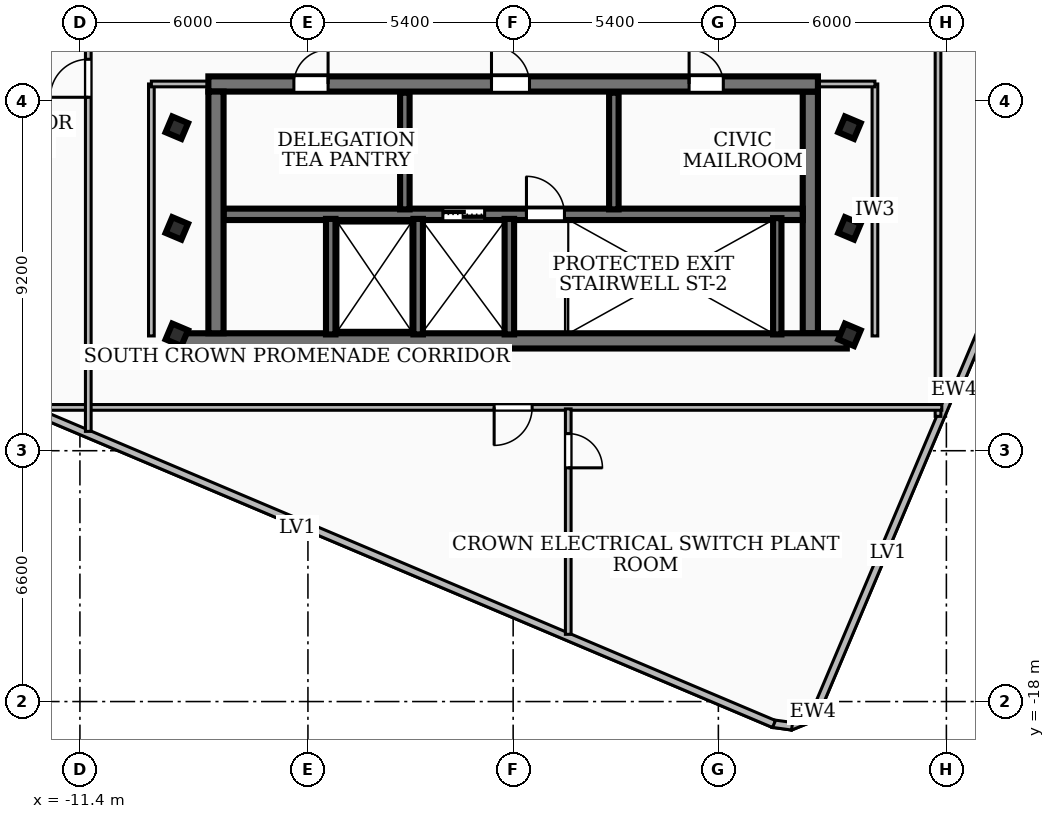
"""IFC4 building model, lengths in metres.
Left out: names, types, materials, properties, quantities, classifications, styles, units other than length and angle.
Written with IfcOpenShell. Run it as: python <this file> out.ifc"""

import sys

from ifc_helpers import new_model, si_unit, direction, frame, frame_2d, origin, origin_2d, place, context, subcontext, project, spatial, rectangle, hollow_rectangle, extrude, element, fill, save


model = new_model("IFC4")
c1 = context("Model", 3, precision=1e-05, world=origin(), true_north=direction((0.0, 1.0)))
c2 = subcontext(c1, "Body", "Model", "MODEL_VIEW")
j1 = project(units=[si_unit("LENGTHUNIT", "METRE"), si_unit("PLANEANGLEUNIT", "RADIAN")], contexts=[c1])
p1 = place(None, origin())
s1 = spatial("IfcSite", under=j1, at=p1, CompositionType="ELEMENT")
p2 = place(p1, origin())
s2 = spatial("IfcBuilding", under=s1, at=p2, CompositionType="ELEMENT")
p3 = place(p2, frame((0.0, 0.0, 301.68)))
s3 = spatial("IfcBuildingStorey", under=s2, at=p3, CompositionType="ELEMENT", Elevation=301.68)
p4 = place(p3, frame((8.78, -8.51, 0.0), z_axis=(0.0, 0.0, 1.0), x_axis=(-1.0, 0.0, 0.0)))
e1 = element("IfcWall", 1, at=p4, inside=s3, PredefinedType="SHEAR", context=c2, shape_type="SweptSolid", body=[
    extrude(rectangle(XDim=17.56, YDim=0.4, at=frame_2d((8.78, 0.0))), origin(), (0.0, 0.0, 1.0), 3.89),
])
p5 = place(p3, frame((-8.02, -1.75, 0.0), z_axis=(0.0, 0.0, 1.0), x_axis=(1.0, 0.0, 0.0)))
e2 = element("IfcWall", 2, at=p5, inside=s3, PredefinedType="SHEAR", context=c2, shape_type="SweptSolid", body=[
    extrude(rectangle(XDim=16.04, YDim=0.4, at=frame_2d((8.02, 0.0))), origin(), (0.0, 0.0, 1.0), 3.89),
])
p6 = place(p5, frame((7.45, 0.0, 0.0)))
e3 = element("IfcOpeningElement", 3, at=p6, cuts=e2, PredefinedType="OPENING", context=c2, shape_type="SweptSolid", body=[
    extrude(rectangle(XDim=1.0, YDim=2.1, at=frame_2d((0.5, 1.05))), frame((0.0, 0.21, 0.0), z_axis=(0.0, -1.0, 0.0), x_axis=(1.0, 0.0, 0.0)), (0.0, 0.0, 1.0), 0.42),
])
p7 = place(p5, frame((12.65, 0.0, 0.0)))
e4 = element("IfcOpeningElement", 4, at=p7, cuts=e2, PredefinedType="OPENING", context=c2, shape_type="SweptSolid", body=[
    extrude(rectangle(XDim=0.9, YDim=2.06, at=frame_2d((0.45, 1.03))), frame((0.0, 0.21, 0.0), z_axis=(0.0, -1.0, 0.0), x_axis=(1.0, 0.0, 0.0)), (0.0, 0.0, 1.0), 0.42),
])
p8 = place(p5, frame((2.25, 0.0, 0.0)))
e5 = element("IfcOpeningElement", 5, at=p8, cuts=e2, PredefinedType="OPENING", context=c2, shape_type="SweptSolid", body=[
    extrude(rectangle(XDim=0.9, YDim=2.06, at=frame_2d((0.45, 1.03))), frame((0.0, 0.21, 0.0), z_axis=(0.0, -1.0, 0.0), x_axis=(1.0, 0.0, 0.0)), (0.0, 0.0, 1.0), 0.42),
])
for number, where, z_axis, x_axis in (
    (6, (-7.82, -8.31, 0.0), (0.0, 0.0, 1.0), (0.0, 1.0, 0.0)),
    (7, (7.82, -1.95, 0.0), (0.0, 0.0, 1.0), (0.0, -1.0, 0.0)),
):
    element("IfcWall", number, at=place(p3, frame(where, z_axis=z_axis, x_axis=x_axis)), inside=s3, PredefinedType="SHEAR", context=c2, shape_type="SweptSolid", body=[
        extrude(rectangle(XDim=6.36, YDim=0.4, at=frame_2d((3.18, 0.0))), origin(), (0.0, 0.0, 1.0), 3.89),
    ])
p9 = place(p3, frame((-7.62, -5.18, 0.0), z_axis=(0.0, 0.0, 1.0), x_axis=(1.0, 0.0, 0.0)))
e8 = element("IfcWall", 8, at=p9, inside=s3, PredefinedType="SOLIDWALL", context=c2, shape_type="SweptSolid", body=[
    extrude(rectangle(XDim=15.24, YDim=0.3, at=frame_2d((7.62, 0.0))), origin(), (0.0, 0.0, 1.0), 3.89),
])
p10 = place(p9, frame((5.77, 0.0, 0.0)))
e9 = element("IfcOpeningElement", 9, at=p10, cuts=e8, PredefinedType="OPENING", context=c2, shape_type="SweptSolid", body=[
    extrude(rectangle(XDim=1.1, YDim=2.15, at=frame_2d((0.55, 1.075))), frame((0.0, 0.16, 0.0), z_axis=(0.0, -1.0, 0.0), x_axis=(1.0, 0.0, 0.0)), (0.0, 0.0, 1.0), 0.32),
])
p11 = place(p9, frame((7.97, 0.0, 0.0)))
e10 = element("IfcOpeningElement", 10, at=p11, cuts=e8, PredefinedType="OPENING", context=c2, shape_type="SweptSolid", body=[
    extrude(rectangle(XDim=1.0, YDim=2.1, at=frame_2d((0.5, 1.05))), frame((0.0, 0.16, 0.0), z_axis=(0.0, -1.0, 0.0), x_axis=(1.0, 0.0, 0.0)), (0.0, 0.0, 1.0), 0.32),
])
p12 = place(p3, frame((6.95, -8.34, 0.0), z_axis=(0.0, 0.0, 1.0), x_axis=(0.0, 1.0, 0.0)))
e11 = element("IfcWall", 11, at=p12, inside=s3, PredefinedType="SOLIDWALL", context=c2, shape_type="SweptSolid", body=[
    extrude(rectangle(XDim=3.06, YDim=0.22, at=frame_2d((1.53, 0.0))), origin(), (0.0, 0.0, 1.0), 3.89),
])
for number, where, z_axis, x_axis in (
    (12, (-0.1, -8.34, 0.0), (0.0, 0.0, 1.0), (0.0, 1.0, 0.0)),
    (13, (-2.5, -8.34, 0.0), (0.0, 0.0, 1.0), (0.0, 1.0, 0.0)),
    (14, (-4.8, -8.34, 0.0), (0.0, 0.0, 1.0), (0.0, 1.0, 0.0)),
):
    element("IfcWall", number, at=place(p3, frame(where, z_axis=z_axis, x_axis=x_axis)), inside=s3, PredefinedType="SOLIDWALL", context=c2, shape_type="SweptSolid", body=[
        extrude(rectangle(XDim=3.04, YDim=0.25, at=frame_2d((1.52, 0.0))), origin(), (0.0, 0.0, 1.0), 3.89),
    ])
for number, where, z_axis, x_axis in (
    (15, (-2.85, -5.05, 0.0), (0.0, 0.0, 1.0), (0.0, 1.0, 0.0)),
    (16, (2.65, -5.05, 0.0), (0.0, 0.0, 1.0), (0.0, 1.0, 0.0)),
):
    element("IfcWall", number, at=place(p3, frame(where, z_axis=z_axis, x_axis=x_axis)), inside=s3, PredefinedType="SOLIDWALL", context=c2, shape_type="SweptSolid", body=[
        extrude(rectangle(XDim=3.07, YDim=0.25, at=frame_2d((1.535, 0.0))), origin(), (0.0, 0.0, 1.0), 3.89),
    ])
for number, where, z_axis, x_axis in (
    (17, (-8.85, -5.55, 0.0), (0.0, 0.0, 1.0), (0.389, 0.921, 0.0)),
    (18, (-8.85, -2.9, 0.0), (0.0, 0.0, 1.0), (0.389, 0.921, 0.0)),
    (19, (8.85, -5.55, 0.0), (0.0, 0.0, 1.0), (0.389, 0.921, 0.0)),
    (20, (8.85, -2.9, 0.0), (0.0, 0.0, 1.0), (0.389, 0.921, 0.0)),
    (21, (8.85, -8.35, 0.0), (0.0, 0.0, 1.0), (0.389, 0.921, 0.0)),
    (22, (-8.85, -8.35, 0.0), (0.0, 0.0, 1.0), (0.389, 0.921, 0.0)),
):
    element("IfcColumn", number, at=place(p3, frame(where, z_axis=z_axis, x_axis=x_axis)), inside=s3, PredefinedType="COLUMN", context=c2, shape_type="SweptSolid", body=[
        extrude(hollow_rectangle(XDim=0.45, YDim=0.45, WallThickness=0.022, at=origin_2d()), origin(), (0.0, 0.0, 1.0), 4.14),
    ])
p13 = place(p3, frame((11.756, -9.608, 0.0), z_axis=(0.0, 0.0, 1.0), x_axis=(-0.61252495827, -0.79045124802, 0.0)))
e23 = element("IfcWall", 23, at=p13, inside=s3, PredefinedType="SOLIDWALL", context=c2, shape_type="SweptSolid", body=[
    extrude(rectangle(XDim=0.49, YDim=0.2, at=frame_2d((0.245, 0.0))), origin(), (0.0, 0.0, 1.0), 3.89),
])
p14 = place(p3, frame((11.481, -9.952, 0.0), z_axis=(0.0, 0.0, 1.0), x_axis=(-0.389505259475, -0.92102424118, 0.0)))
e24 = element("IfcWall", 24, at=p14, inside=s3, PredefinedType="SOLIDWALL", context=c2, shape_type="SweptSolid", body=[
    extrude(rectangle(XDim=8.867, YDim=0.2, at=frame_2d((4.434, 0.0))), origin(), (0.0, 0.0, 1.0), 3.89),
])
p15 = place(p3, frame((8.052, -18.076, 0.0), z_axis=(0.0, 0.0, 1.0), x_axis=(-0.613266470563, -0.789876089069, 0.0)))
e25 = element("IfcWall", 25, at=p15, inside=s3, PredefinedType="SOLIDWALL", context=c2, shape_type="SweptSolid", body=[
    extrude(rectangle(XDim=0.527, YDim=0.2, at=frame_2d((0.263, 0.0))), origin(), (0.0, 0.0, 1.0), 3.89),
])
p16 = place(p3, frame((7.767, -18.463, 0.0), z_axis=(0.0, 0.0, 1.0), x_axis=(-0.926663227271, -0.375892621934, 0.0)))
e26 = element("IfcWall", 26, at=p16, inside=s3, PredefinedType="SOLIDWALL", context=c2, shape_type="SweptSolid", body=[
    extrude(rectangle(XDim=0.514, YDim=0.2, at=frame_2d((0.257, 0.0))), origin(), (0.0, 0.0, 1.0), 3.89),
])
p17 = place(p3, frame((7.339, -18.65, 0.0), z_axis=(0.0, 0.0, 1.0), x_axis=(-0.99065777357, 0.136371462064, 0.0)))
e27 = element("IfcWall", 27, at=p17, inside=s3, PredefinedType="SOLIDWALL", context=c2, shape_type="SweptSolid", body=[
    extrude(rectangle(XDim=0.528, YDim=0.2, at=frame_2d((0.264, 0.0))), origin(), (0.0, 0.0, 1.0), 3.89),
])
p18 = place(p3, frame((6.864, -18.591, 0.0), z_axis=(0.0, 0.0, 1.0), x_axis=(-0.921043011302, 0.389460872658, 0.0)))
e28 = element("IfcWall", 28, at=p18, inside=s3, PredefinedType="SOLIDWALL", context=c2, shape_type="SweptSolid", body=[
    extrude(rectangle(XDim=27.125, YDim=0.2, at=frame_2d((13.562, 0.0))), origin(), (0.0, 0.0, 1.0), 3.89),
])
p19 = place(p3, frame((15.096, -1.693, 0.0), z_axis=(0.0, 0.0, 1.0), x_axis=(-0.389467605067, -0.92104016449, 0.0)))
e29 = element("IfcWall", 29, at=p19, inside=s3, PredefinedType="SOLIDWALL", context=c2, shape_type="SweptSolid", body=[
    extrude(rectangle(XDim=8.64, YDim=0.2, at=frame_2d((4.32, 0.0))), origin(), (0.0, 0.0, 1.0), 3.89),
])
p20 = place(p3, frame((-9.52, -8.38, 0.0), z_axis=(0.0, 0.0, 1.0), x_axis=(0.0, 1.0, 0.0)))
e30 = element("IfcWall", 30, at=p20, inside=s3, PredefinedType="PARTITIONING", context=c2, shape_type="SweptSolid", body=[
    extrude(rectangle(XDim=6.63, YDim=0.15, at=frame_2d((3.315, 0.0))), origin(), (0.0, 0.0, 1.0), 3.89),
])
p21 = place(p3, frame((-7.85, -1.75, 0.0), z_axis=(0.0, 0.0, 1.0), x_axis=(-1.0, 0.0, 0.0)))
e31 = element("IfcWall", 31, at=p21, inside=s3, PredefinedType="PARTITIONING", context=c2, shape_type="SweptSolid", body=[
    extrude(rectangle(XDim=1.67, YDim=0.15, at=frame_2d((0.835, 0.0))), origin(), (0.0, 0.0, 1.0), 3.27),
])
p22 = place(p3, frame((9.52, -8.38, 0.0), z_axis=(0.0, 0.0, 1.0), x_axis=(0.0, 1.0, 0.0)))
e32 = element("IfcWall", 32, at=p22, inside=s3, PredefinedType="PARTITIONING", context=c2, shape_type="SweptSolid", body=[
    extrude(rectangle(XDim=6.63, YDim=0.15, at=frame_2d((3.315, 0.0))), origin(), (0.0, 0.0, 1.0), 3.26),
])
p23 = place(p3, frame((7.85, -1.75, 0.0), z_axis=(0.0, 0.0, 1.0), x_axis=(1.0, 0.0, 0.0)))
e33 = element("IfcWall", 33, at=p23, inside=s3, PredefinedType="PARTITIONING", context=c2, shape_type="SweptSolid", body=[
    extrude(rectangle(XDim=1.67, YDim=0.15, at=frame_2d((0.835, 0.0))), origin(), (0.0, 0.0, 1.0), 3.27),
])
p24 = place(p3, frame((11.18, 10.891, 0.0), z_axis=(0.0, 0.0, 1.0), x_axis=(0.0, -1.0, 0.0)))
e34 = element("IfcWall", 34, at=p24, inside=s3, PredefinedType="PARTITIONING", context=c2, shape_type="SweptSolid", body=[
    extrude(rectangle(XDim=21.387, YDim=0.15, at=frame_2d((10.694, 0.0))), origin(), (0.0, 0.0, 1.0), 3.26),
])
p25 = place(p24, frame((10.391, 0.0, 0.0)))
e35 = element("IfcOpeningElement", 35, at=p25, cuts=e34, PredefinedType="OPENING", context=c2, shape_type="SweptSolid", body=[
    extrude(rectangle(XDim=1.0, YDim=2.1, at=frame_2d((0.5, 1.05))), frame((0.0, 0.085, 0.0), z_axis=(0.0, -1.0, 0.0), x_axis=(1.0, 0.0, 0.0)), (0.0, 0.0, 1.0), 0.17),
])
p26 = place(p3, frame((-11.18, -10.891, 0.0), z_axis=(0.0, 0.0, 1.0), x_axis=(0.0, 1.0, 0.0)))
e36 = element("IfcWall", 36, at=p26, inside=s3, PredefinedType="PARTITIONING", context=c2, shape_type="SweptSolid", body=[
    extrude(rectangle(XDim=21.387, YDim=0.15, at=frame_2d((10.694, 0.0))), origin(), (0.0, 0.0, 1.0), 3.26),
])
p27 = place(p26, frame((8.791, 0.0, 0.0)))
e37 = element("IfcOpeningElement", 37, at=p27, cuts=e36, PredefinedType="OPENING", context=c2, shape_type="SweptSolid", body=[
    extrude(rectangle(XDim=1.0, YDim=2.1, at=frame_2d((0.5, 1.05))), frame((0.0, 0.085, 0.0), z_axis=(0.0, -1.0, 0.0), x_axis=(1.0, 0.0, 0.0)), (0.0, 0.0, 1.0), 0.17),
])
p28 = place(p3, frame((11.28, -10.26, 0.0), z_axis=(0.0, 0.0, 1.0), x_axis=(-1.0, 0.0, 0.0)))
e38 = element("IfcWall", 38, at=p28, inside=s3, PredefinedType="PARTITIONING", context=c2, shape_type="SweptSolid", body=[
    extrude(rectangle(XDim=23.952, YDim=0.15, at=frame_2d((11.976, 0.0))), origin(), (0.0, 0.0, 1.0), 3.26),
])
p29 = place(p28, frame((10.78, 0.0, 0.0)))
e39 = element("IfcOpeningElement", 39, at=p29, cuts=e38, PredefinedType="OPENING", context=c2, shape_type="SweptSolid", body=[
    extrude(rectangle(XDim=1.0, YDim=2.1, at=frame_2d((0.5, 1.05))), frame((0.0, 0.085, 0.0), z_axis=(0.0, -1.0, 0.0), x_axis=(1.0, 0.0, 0.0)), (0.0, 0.0, 1.0), 0.17),
])
p30 = place(p3, frame((1.45, -10.3, 0.0), z_axis=(0.0, 0.0, 1.0), x_axis=(0.0, -1.0, 0.0)))
e40 = element("IfcWall", 40, at=p30, inside=s3, PredefinedType="PARTITIONING", context=c2, shape_type="SweptSolid", body=[
    extrude(rectangle(XDim=5.931, YDim=0.15, at=frame_2d((2.965, 0.0))), origin(), (0.0, 0.0, 1.0), 3.89),
])
p31 = place(p30, frame((0.65, 0.0, 0.0)))
e41 = element("IfcOpeningElement", 41, at=p31, cuts=e40, PredefinedType="OPENING", context=c2, shape_type="SweptSolid", body=[
    extrude(rectangle(XDim=0.9, YDim=2.06, at=frame_2d((0.45, 1.03))), frame((0.0, 0.085, 0.0), z_axis=(0.0, -1.0, 0.0), x_axis=(1.0, 0.0, 0.0)), (0.0, 0.0, 1.0), 0.17),
])
p32 = place(p6, origin())
e42 = element("IfcDoor", 42, at=p32, inside=s3, OperationType="SINGLE_SWING_LEFT", PredefinedType="DOOR", context=c2, shape_type="SweptSolid", body=[
    extrude(rectangle(XDim=1.0, YDim=2.1, at=frame_2d((0.5, 1.05))), frame((0.0, 0.025, 0.0), z_axis=(0.0, -1.0, 0.0), x_axis=(1.0, 0.0, 0.0)), (0.0, 0.0, 1.0), 0.05),
])
fill(e3, e42)
p33 = place(p10, origin())
e43 = element("IfcDoor", 43, at=p33, inside=s3, OperationType="DOUBLE_DOOR_SLIDING", PredefinedType="DOOR", context=c2, shape_type="SweptSolid", body=[
    extrude(rectangle(XDim=1.1, YDim=2.15, at=frame_2d((0.55, 1.075))), frame((0.0, 0.025, 0.0), z_axis=(0.0, -1.0, 0.0), x_axis=(1.0, 0.0, 0.0)), (0.0, 0.0, 1.0), 0.05),
])
fill(e9, e43)
p34 = place(p11, origin())
e44 = element("IfcDoor", 44, at=p34, inside=s3, OperationType="SINGLE_SWING_LEFT", PredefinedType="DOOR", context=c2, shape_type="SweptSolid", body=[
    extrude(rectangle(XDim=1.0, YDim=2.1, at=frame_2d((0.5, 1.05))), frame((0.0, 0.025, 0.0), z_axis=(0.0, -1.0, 0.0), x_axis=(1.0, 0.0, 0.0)), (0.0, 0.0, 1.0), 0.05),
])
fill(e10, e44)
p35 = place(p7, origin())
e45 = element("IfcDoor", 45, at=p35, inside=s3, OperationType="SINGLE_SWING_LEFT", PredefinedType="DOOR", context=c2, shape_type="SweptSolid", body=[
    extrude(rectangle(XDim=0.9, YDim=2.06, at=frame_2d((0.45, 1.03))), frame((0.0, 0.025, 0.0), z_axis=(0.0, -1.0, 0.0), x_axis=(1.0, 0.0, 0.0)), (0.0, 0.0, 1.0), 0.05),
])
fill(e4, e45)
p36 = place(p8, origin())
e46 = element("IfcDoor", 46, at=p36, inside=s3, OperationType="SINGLE_SWING_RIGHT", PredefinedType="DOOR", context=c2, shape_type="SweptSolid", body=[
    extrude(rectangle(XDim=0.9, YDim=2.06, at=frame_2d((0.45, 1.03))), frame((0.0, 0.025, 0.0), z_axis=(0.0, -1.0, 0.0), x_axis=(1.0, 0.0, 0.0)), (0.0, 0.0, 1.0), 0.05),
])
fill(e5, e46)
p37 = place(p27, origin())
e47 = element("IfcDoor", 47, at=p37, inside=s3, OperationType="SINGLE_SWING_LEFT", PredefinedType="DOOR", context=c2, shape_type="SweptSolid", body=[
    extrude(rectangle(XDim=1.0, YDim=2.1, at=frame_2d((0.5, 1.05))), frame((0.0, 0.025, 0.0), z_axis=(0.0, -1.0, 0.0), x_axis=(1.0, 0.0, 0.0)), (0.0, 0.0, 1.0), 0.05),
])
fill(e37, e47)
p38 = place(p29, origin())
e48 = element("IfcDoor", 48, at=p38, inside=s3, OperationType="SINGLE_SWING_RIGHT", PredefinedType="DOOR", context=c2, shape_type="SweptSolid", body=[
    extrude(rectangle(XDim=1.0, YDim=2.1, at=frame_2d((0.5, 1.05))), frame((0.0, 0.025, 0.0), z_axis=(0.0, -1.0, 0.0), x_axis=(1.0, 0.0, 0.0)), (0.0, 0.0, 1.0), 0.05),
])
fill(e39, e48)
p39 = place(p31, origin())
e49 = element("IfcDoor", 49, at=p39, inside=s3, OperationType="SINGLE_SWING_RIGHT", PredefinedType="DOOR", context=c2, shape_type="SweptSolid", body=[
    extrude(rectangle(XDim=0.9, YDim=2.06, at=frame_2d((0.45, 1.03))), frame((0.0, 0.025, 0.0), z_axis=(0.0, -1.0, 0.0), x_axis=(1.0, 0.0, 0.0)), (0.0, 0.0, 1.0), 0.05),
])
fill(e41, e49)
save(model, sys.argv[1])
